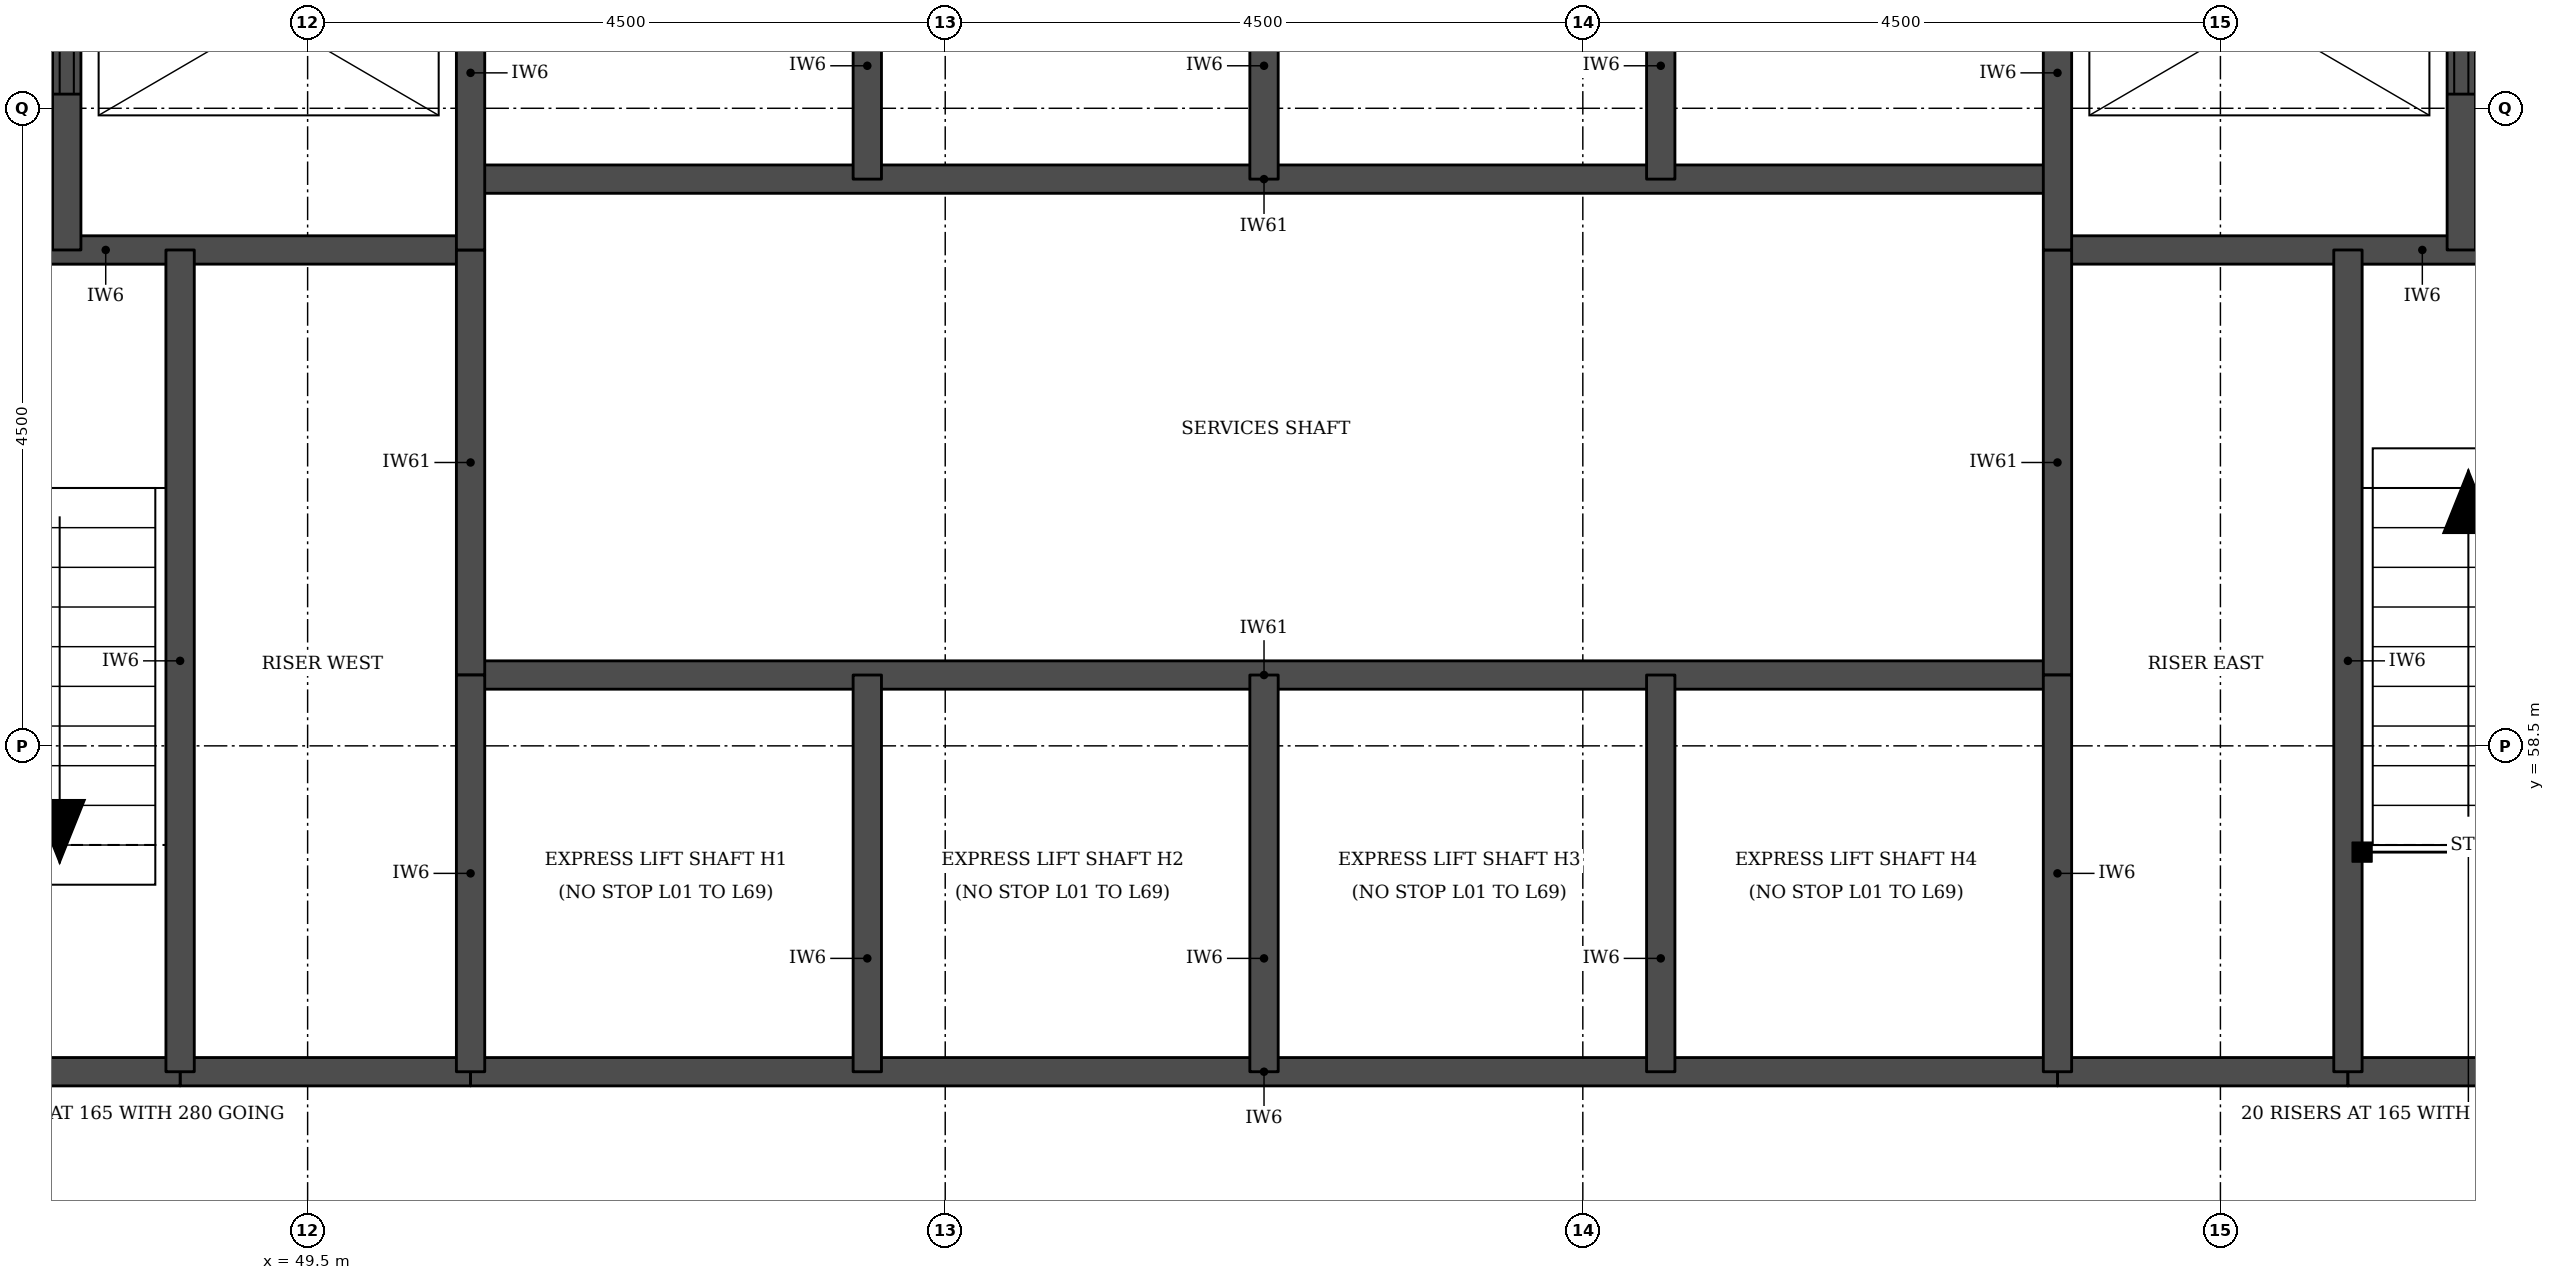
"""IFC4 building model, lengths in metres.
Left out: names, types, materials, properties, quantities, classifications, styles, units other than length and angle.
Written with IfcOpenShell. Run it as: python <this file> out.ifc"""

import sys

from ifc_helpers import new_model, si_unit, direction, frame, frame_2d, origin, place, context, subcontext, project, spatial, rectangle, extrude, element, fill, save


model = new_model("IFC4")
c1 = context("Model", 3, precision=1e-05, world=origin(), true_north=direction((0.0, 1.0)))
c2 = subcontext(c1, "Body", "Model", "MODEL_VIEW")
j1 = project(units=[si_unit("LENGTHUNIT", "METRE"), si_unit("PLANEANGLEUNIT", "RADIAN")], contexts=[c1])
p1 = place(None, origin())
s1 = spatial("IfcSite", under=j1, at=p1, CompositionType="ELEMENT")
p2 = place(p1, origin())
s2 = spatial("IfcBuilding", under=s1, at=p2, CompositionType="ELEMENT")
p3 = place(p2, frame((0.0, 0.0, 33.0)))
s3 = spatial("IfcBuildingStorey", under=s2, at=p3, CompositionType="ELEMENT", Elevation=33.0)
for number, where, z_axis, x_axis in (
    (1, (48.6, 56.2, 0.0), (0.0, 0.0, 1.0), (1.0, 0.0, 0.0)),
    (2, (61.85, 56.2, 0.0), (0.0, 0.0, 1.0), (1.0, 0.0, 0.0)),
):
    element("IfcWall", number, at=place(p3, frame(where, z_axis=z_axis, x_axis=x_axis)), inside=s3, PredefinedType="SOLIDWALL", context=c2, shape_type="SweptSolid", body=[
        extrude(rectangle(XDim=2.05, YDim=0.2, at=frame_2d((1.025, 0.0))), origin(), (0.0, 0.0, 1.0), 3.08),
    ])
p4 = place(p3, frame((45.5, 56.2, 0.0), z_axis=(0.0, 0.0, 1.0), x_axis=(1.0, 0.0, 0.0)))
e3 = element("IfcWall", 3, at=p4, inside=s3, PredefinedType="SOLIDWALL", context=c2, shape_type="SweptSolid", body=[
    extrude(rectangle(XDim=3.1, YDim=0.2, at=frame_2d((1.55, 0.0))), origin(), (0.0, 0.0, 1.0), 3.08),
])
p5 = place(p3, frame((50.65, 56.2, 0.0), z_axis=(0.0, 0.0, 1.0), x_axis=(1.0, 0.0, 0.0)))
e4 = element("IfcWall", 4, at=p5, inside=s3, PredefinedType="SOLIDWALL", context=c2, shape_type="SweptSolid", body=[
    extrude(rectangle(XDim=11.2, YDim=0.2, at=frame_2d((5.6, 0.0))), origin(), (0.0, 0.0, 1.0), 3.08),
])
p6 = place(p3, frame((63.9, 56.2, 0.0), z_axis=(0.0, 0.0, 1.0), x_axis=(1.0, 0.0, 0.0)))
e5 = element("IfcWall", 5, at=p6, inside=s3, PredefinedType="SOLIDWALL", context=c2, shape_type="SweptSolid", body=[
    extrude(rectangle(XDim=3.1, YDim=0.2, at=frame_2d((1.55, 0.0))), origin(), (0.0, 0.0, 1.0), 3.08),
])
p7 = place(p3, frame((50.65, 59.0, 0.0), z_axis=(0.0, 0.0, 1.0), x_axis=(1.0, 0.0, 0.0)))
e6 = element("IfcWall", 6, at=p7, inside=s3, PredefinedType="SOLIDWALL", context=c2, shape_type="SweptSolid", body=[
    extrude(rectangle(XDim=11.2, YDim=0.2, at=frame_2d((5.6, 0.0))), origin(), (0.0, 0.0, 1.0), 3.3),
])
for number, where, z_axis, x_axis in (
    (7, (45.5, 62.0, 0.0), (0.0, 0.0, 1.0), (1.0, 0.0, 0.0)),
    (8, (61.85, 62.0, 0.0), (0.0, 0.0, 1.0), (1.0, 0.0, 0.0)),
):
    element("IfcWall", number, at=place(p3, frame(where, z_axis=z_axis, x_axis=x_axis)), inside=s3, PredefinedType="SOLIDWALL", context=c2, shape_type="SweptSolid", body=[
        extrude(rectangle(XDim=5.15, YDim=0.2, at=frame_2d((2.575, 0.0))), origin(), (0.0, 0.0, 1.0), 3.08),
    ])
p8 = place(p3, frame((50.65, 62.5, 0.0), z_axis=(0.0, 0.0, 1.0), x_axis=(1.0, 0.0, 0.0)))
e9 = element("IfcWall", 9, at=p8, inside=s3, PredefinedType="SOLIDWALL", context=c2, shape_type="SweptSolid", body=[
    extrude(rectangle(XDim=11.2, YDim=0.2, at=frame_2d((5.6, 0.0))), origin(), (0.0, 0.0, 1.0), 3.3),
])
p9 = place(p3, frame((47.8, 62.0, 0.0), z_axis=(0.0, 0.0, 1.0), x_axis=(0.0, 1.0, 0.0)))
e10 = element("IfcWall", 10, at=p9, inside=s3, PredefinedType="SOLIDWALL", context=c2, shape_type="SweptSolid", body=[
    extrude(rectangle(XDim=3.3, YDim=0.2, at=frame_2d((1.65, 0.0))), origin(), (0.0, 0.0, 1.0), 3.08),
])
p10 = place(p9, frame((1.1, 0.0, 0.0)))
e11 = element("IfcOpeningElement", 11, at=p10, cuts=e10, PredefinedType="OPENING", context=c2, shape_type="SweptSolid", body=[
    extrude(rectangle(XDim=1.1, YDim=2.1, at=frame_2d((0.55, 1.05))), frame((0.0, 0.11, 0.0), z_axis=(0.0, -1.0, 0.0), x_axis=(1.0, 0.0, 0.0)), (0.0, 0.0, 1.0), 0.22),
])
p11 = place(p3, frame((48.6, 56.2, 0.0), z_axis=(0.0, 0.0, 1.0), x_axis=(0.0, 1.0, 0.0)))
e12 = element("IfcWall", 12, at=p11, inside=s3, PredefinedType="SOLIDWALL", context=c2, shape_type="SweptSolid", body=[
    extrude(rectangle(XDim=5.8, YDim=0.2, at=frame_2d((2.9, 0.0))), origin(), (0.0, 0.0, 1.0), 3.08),
])
p12 = place(p3, frame((50.65, 59.0, 0.0), z_axis=(0.0, 0.0, 1.0), x_axis=(0.0, 1.0, 0.0)))
e13 = element("IfcWall", 13, at=p12, inside=s3, PredefinedType="SOLIDWALL", context=c2, shape_type="SweptSolid", body=[
    extrude(rectangle(XDim=3.0, YDim=0.2, at=frame_2d((1.5, 0.0))), origin(), (0.0, 0.0, 1.0), 3.3),
])
p13 = place(p3, frame((50.65, 56.2, 0.0), z_axis=(0.0, 0.0, 1.0), x_axis=(0.0, 1.0, 0.0)))
e14 = element("IfcWall", 14, at=p13, inside=s3, PredefinedType="SOLIDWALL", context=c2, shape_type="SweptSolid", body=[
    extrude(rectangle(XDim=2.8, YDim=0.2, at=frame_2d((1.4, 0.0))), origin(), (0.0, 0.0, 1.0), 3.08),
])
p14 = place(p3, frame((50.65, 62.0, 0.0), z_axis=(0.0, 0.0, 1.0), x_axis=(0.0, 1.0, 0.0)))
e15 = element("IfcWall", 15, at=p14, inside=s3, PredefinedType="SOLIDWALL", context=c2, shape_type="SweptSolid", body=[
    extrude(rectangle(XDim=3.3, YDim=0.2, at=frame_2d((1.65, 0.0))), origin(), (0.0, 0.0, 1.0), 3.08),
])
for number, where, z_axis, x_axis in (
    (16, (53.45, 56.2, 0.0), (0.0, 0.0, 1.0), (0.0, 1.0, 0.0)),
    (17, (53.45, 62.5, 0.0), (0.0, 0.0, 1.0), (0.0, 1.0, 0.0)),
    (18, (56.25, 56.2, 0.0), (0.0, 0.0, 1.0), (0.0, 1.0, 0.0)),
    (19, (56.25, 62.5, 0.0), (0.0, 0.0, 1.0), (0.0, 1.0, 0.0)),
    (20, (59.05, 56.2, 0.0), (0.0, 0.0, 1.0), (0.0, 1.0, 0.0)),
    (21, (59.05, 62.5, 0.0), (0.0, 0.0, 1.0), (0.0, 1.0, 0.0)),
):
    element("IfcWall", number, at=place(p3, frame(where, z_axis=z_axis, x_axis=x_axis)), inside=s3, PredefinedType="SOLIDWALL", context=c2, shape_type="SweptSolid", body=[
        extrude(rectangle(XDim=2.8, YDim=0.2, at=frame_2d((1.4, 0.0))), origin(), (0.0, 0.0, 1.0), 3.08),
    ])
p15 = place(p3, frame((61.85, 59.0, 0.0), z_axis=(0.0, 0.0, 1.0), x_axis=(0.0, 1.0, 0.0)))
e22 = element("IfcWall", 22, at=p15, inside=s3, PredefinedType="SOLIDWALL", context=c2, shape_type="SweptSolid", body=[
    extrude(rectangle(XDim=3.0, YDim=0.2, at=frame_2d((1.5, 0.0))), origin(), (0.0, 0.0, 1.0), 3.3),
])
p16 = place(p3, frame((61.85, 56.2, 0.0), z_axis=(0.0, 0.0, 1.0), x_axis=(0.0, 1.0, 0.0)))
e23 = element("IfcWall", 23, at=p16, inside=s3, PredefinedType="SOLIDWALL", context=c2, shape_type="SweptSolid", body=[
    extrude(rectangle(XDim=2.8, YDim=0.2, at=frame_2d((1.4, 0.0))), origin(), (0.0, 0.0, 1.0), 3.08),
])
p17 = place(p3, frame((61.85, 62.0, 0.0), z_axis=(0.0, 0.0, 1.0), x_axis=(0.0, 1.0, 0.0)))
e24 = element("IfcWall", 24, at=p17, inside=s3, PredefinedType="SOLIDWALL", context=c2, shape_type="SweptSolid", body=[
    extrude(rectangle(XDim=3.3, YDim=0.2, at=frame_2d((1.65, 0.0))), origin(), (0.0, 0.0, 1.0), 3.08),
])
p18 = place(p3, frame((63.9, 56.2, 0.0), z_axis=(0.0, 0.0, 1.0), x_axis=(0.0, 1.0, 0.0)))
e25 = element("IfcWall", 25, at=p18, inside=s3, PredefinedType="SOLIDWALL", context=c2, shape_type="SweptSolid", body=[
    extrude(rectangle(XDim=5.8, YDim=0.2, at=frame_2d((2.9, 0.0))), origin(), (0.0, 0.0, 1.0), 3.08),
])
p19 = place(p3, frame((64.7, 62.0, 0.0), z_axis=(0.0, 0.0, 1.0), x_axis=(0.0, 1.0, 0.0)))
e26 = element("IfcWall", 26, at=p19, inside=s3, PredefinedType="SOLIDWALL", context=c2, shape_type="SweptSolid", body=[
    extrude(rectangle(XDim=3.3, YDim=0.2, at=frame_2d((1.65, 0.0))), origin(), (0.0, 0.0, 1.0), 3.08),
])
p20 = place(p19, frame((1.1, 0.0, 0.0)))
e27 = element("IfcOpeningElement", 27, at=p20, cuts=e26, PredefinedType="OPENING", context=c2, shape_type="SweptSolid", body=[
    extrude(rectangle(XDim=1.1, YDim=2.1, at=frame_2d((0.55, 1.05))), frame((0.0, 0.11, 0.0), z_axis=(0.0, -1.0, 0.0), x_axis=(1.0, 0.0, 0.0)), (0.0, 0.0, 1.0), 0.22),
])
p21 = place(p10, origin())
e28 = element("IfcDoor", 28, at=p21, inside=s3, OperationType="DOUBLE_DOOR_SLIDING", PredefinedType="DOOR", context=c2, shape_type="SweptSolid", body=[
    extrude(rectangle(XDim=1.1, YDim=2.1, at=frame_2d((0.55, 1.05))), frame((0.0, 0.025, 0.0), z_axis=(0.0, -1.0, 0.0), x_axis=(1.0, 0.0, 0.0)), (0.0, 0.0, 1.0), 0.05),
])
fill(e11, e28)
p22 = place(p20, origin())
e29 = element("IfcDoor", 29, at=p22, inside=s3, OperationType="DOUBLE_DOOR_SLIDING", PredefinedType="DOOR", context=c2, shape_type="SweptSolid", body=[
    extrude(rectangle(XDim=1.1, YDim=2.1, at=frame_2d((0.55, 1.05))), frame((0.0, 0.025, 0.0), z_axis=(0.0, -1.0, 0.0), x_axis=(1.0, 0.0, 0.0)), (0.0, 0.0, 1.0), 0.05),
])
fill(e27, e29)
save(model, sys.argv[1])
